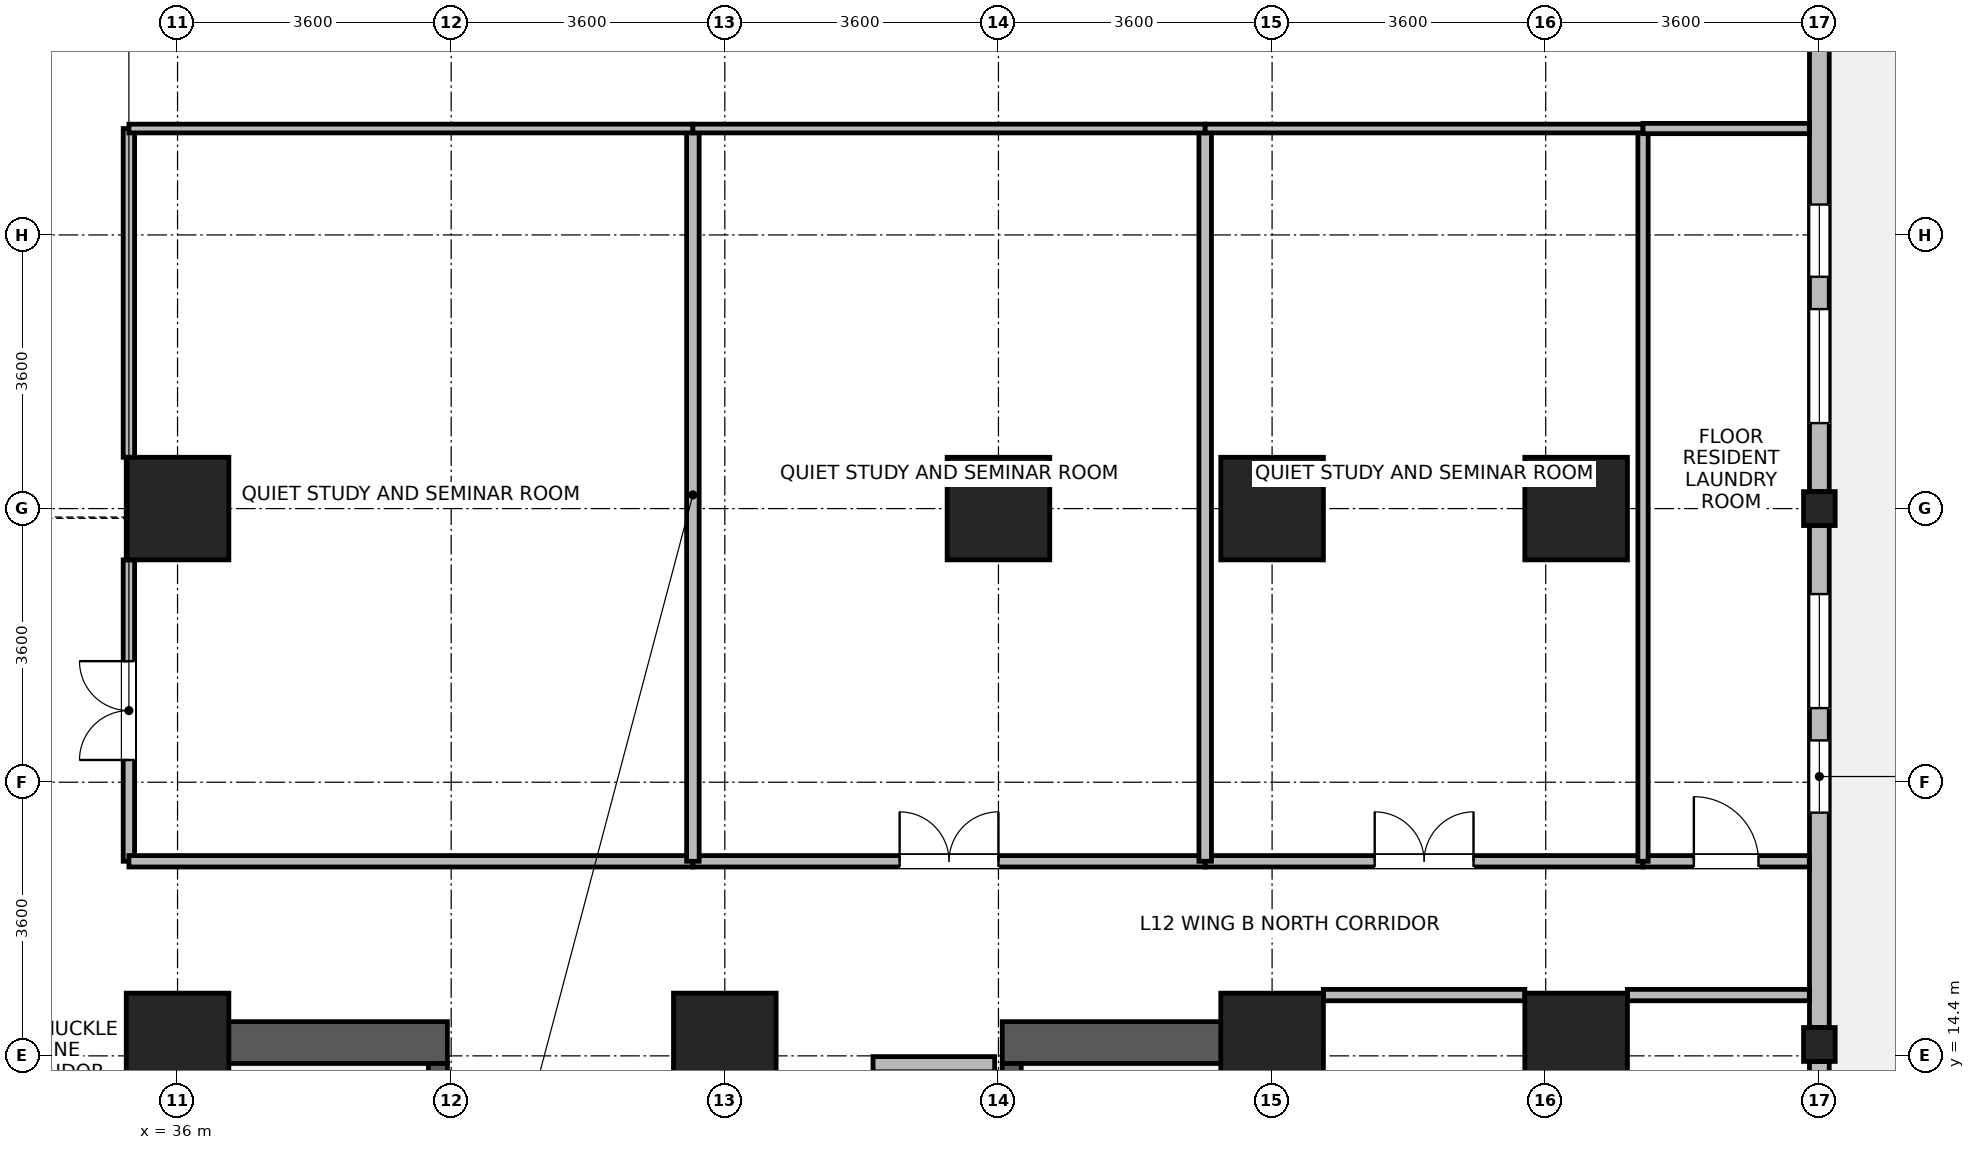
"""IFC4 building model, lengths in metres.
Left out: names, types, materials, properties, quantities, classifications, styles, units other than length and angle.
Written with IfcOpenShell. Run it as: python <this file> out.ifc"""

import sys

from ifc_helpers import new_model, si_unit, direction, frame, frame_2d, origin, origin_2d, place, context, subcontext, project, spatial, rectangle, i_section, extrude, source, transform, mapped, element, fill, save


model = new_model("IFC4")
c1 = context("Model", 3, precision=1e-05, world=origin(), true_north=direction((0.0, 1.0)))
c2 = subcontext(c1, "Body", "Model", "MODEL_VIEW")
j1 = project(units=[si_unit("LENGTHUNIT", "METRE"), si_unit("PLANEANGLEUNIT", "RADIAN")], contexts=[c1])
p1 = place(None, origin())
s1 = spatial("IfcSite", under=j1, at=p1, CompositionType="ELEMENT")
p2 = place(p1, origin())
s2 = spatial("IfcBuilding", under=s1, at=p2, CompositionType="ELEMENT")
p3 = place(p2, frame((0.0, 0.0, 51.2)))
s3 = spatial("IfcBuildingStorey", under=s2, at=p3, CompositionType="ELEMENT", Elevation=51.2)
for number, where, z_axis, x_axis in (
    (1, (36.075, 6.75, 0.0), (0.0, 0.0, 1.0), (0.0, 1.0, 0.0)),
    (2, (50.325, 6.75, 0.0), (0.0, 0.0, 1.0), (0.0, 1.0, 0.0)),
):
    element("IfcWall", number, at=place(p3, frame(where, z_axis=z_axis, x_axis=x_axis)), inside=s3, PredefinedType="SHEAR", context=c2, shape_type="SweptSolid", body=[
        extrude(rectangle(XDim=8.1, YDim=0.55, at=frame_2d((4.05, 0.0))), origin(), (0.0, 0.0, 1.0), 3.45),
    ])
for number, where, z_axis, x_axis in (
    (3, (36.35, 14.575, 0.0), (0.0, 0.0, 1.0), (1.0, 0.0, 0.0)),
    (4, (46.85, 14.575, 0.0), (0.0, 0.0, 1.0), (1.0, 0.0, 0.0)),
):
    element("IfcWall", number, at=place(p3, frame(where, z_axis=z_axis, x_axis=x_axis)), inside=s3, PredefinedType="SHEAR", context=c2, shape_type="SweptSolid", body=[
        extrude(rectangle(XDim=3.2, YDim=0.55, at=frame_2d((1.6, 0.0))), origin(), (0.0, 0.0, 1.0), 3.45),
    ])
p4 = place(p3, frame((39.425, 7.3, 0.0), z_axis=(0.0, 0.0, 1.0), x_axis=(0.0, 1.0, 0.0)))
e5 = element("IfcWall", 5, at=p4, inside=s3, PredefinedType="SHEAR", context=c2, shape_type="SweptSolid", body=[
    extrude(rectangle(XDim=7.0, YDim=0.25, at=frame_2d((3.5, 0.0))), origin(), (0.0, 0.0, 1.0), 3.45),
])
p5 = place(p4, frame((0.15, 0.0, 0.0)))
e6 = element("IfcOpeningElement", 6, at=p5, cuts=e5, PredefinedType="OPENING", context=c2, shape_type="SweptSolid", body=[
    extrude(rectangle(XDim=1.1, YDim=2.08, at=frame_2d((0.55, 1.04))), frame((0.0, 0.135, 0.0), z_axis=(0.0, -1.0, 0.0), x_axis=(1.0, 0.0, 0.0)), (0.0, 0.0, 1.0), 0.27),
])
p6 = place(p3, frame((46.975, 7.3, 0.0), z_axis=(0.0, 0.0, 1.0), x_axis=(0.0, 1.0, 0.0)))
e7 = element("IfcWall", 7, at=p6, inside=s3, PredefinedType="SHEAR", context=c2, shape_type="SweptSolid", body=[
    extrude(rectangle(XDim=7.0, YDim=0.25, at=frame_2d((3.5, 0.0))), origin(), (0.0, 0.0, 1.0), 3.45),
])
p7 = place(p6, frame((0.15, 0.0, 0.0)))
e8 = element("IfcOpeningElement", 8, at=p7, cuts=e7, PredefinedType="OPENING", context=c2, shape_type="SweptSolid", body=[
    extrude(rectangle(XDim=1.1, YDim=2.08, at=frame_2d((0.55, 1.04))), frame((0.0, 0.135, 0.0), z_axis=(0.0, -1.0, 0.0), x_axis=(1.0, 0.0, 0.0)), (0.0, 0.0, 1.0), 0.27),
])
m1 = source(origin(), c2, "Body", "SweptSolid", [
    extrude(rectangle(XDim=1.35, YDim=1.35, at=origin_2d()), origin(), (0.0, 0.0, 1.0), 3.7),
])
for number, where, z_axis, x_axis in (
    (9, (36.0, 21.6, 0.0), (0.0, 0.0, 1.0), (1.0, 0.0, 0.0)),
    (10, (46.8, 21.6, 0.0), (0.0, 0.0, 1.0), (1.0, 0.0, 0.0)),
    (11, (36.0, 14.55, 0.0), (0.0, 0.0, 1.0), (1.0, 0.0, 0.0)),
    (12, (43.2, 14.55, 0.0), (0.0, 0.0, 1.0), (1.0, 0.0, 0.0)),
    (13, (50.4, 14.55, 0.0), (0.0, 0.0, 1.0), (1.0, 0.0, 0.0)),
    (14, (50.4, 21.6, 0.0), (0.0, 0.0, 1.0), (1.0, 0.0, 0.0)),
    (15, (54.4, 14.55, 0.0), (0.0, 0.0, 1.0), (1.0, 0.0, 0.0)),
    (16, (54.4, 21.6, 0.0), (0.0, 0.0, 1.0), (1.0, 0.0, 0.0)),
):
    element("IfcColumn", number, at=place(p3, frame(where, z_axis=z_axis, x_axis=x_axis)), inside=s3, PredefinedType="COLUMN", context=c2, shape_type="MappedRepresentation", body=[
        mapped(m1, transform((0.0, 0.0, 0.0), x_axis=(1.0, 0.0, 0.0), y_axis=(0.0, 1.0, 0.0), z_axis=(0.0, 0.0, 1.0), scale=1.0)),
    ])
m2 = source(origin(), c2, "Body", "SweptSolid", [
    extrude(i_section(OverallWidth=0.416, OverallDepth=0.446, WebThickness=0.029, FlangeThickness=0.04, FilletRadius=0.015, at=origin_2d()), origin(), (0.0, 0.0, 1.0), 3.7),
])
for number, where, z_axis, x_axis in (
    (17, (57.6, 14.55, 0.0), (0.0, 0.0, 1.0), (1.0, 0.0, 0.0)),
    (18, (57.6, 21.6, 0.0), (0.0, 0.0, 1.0), (1.0, 0.0, 0.0)),
):
    element("IfcColumn", number, at=place(p3, frame(where, z_axis=z_axis, x_axis=x_axis)), inside=s3, PredefinedType="COLUMN", context=c2, shape_type="MappedRepresentation", body=[
        mapped(m2, transform((0.0, 0.0, 0.0), x_axis=(1.0, 0.0, 0.0), y_axis=(0.0, 1.0, 0.0), z_axis=(0.0, 0.0, 1.0), scale=1.0)),
    ])
p8 = place(p3, frame((57.6, 14.326, 0.0), z_axis=(0.0, 0.0, 1.0), x_axis=(0.0, -1.0, 0.0)))
e19 = element("IfcWall", 19, at=p8, inside=s3, PredefinedType="STANDARD", context=c2, shape_type="SweptSolid", body=[
    extrude(rectangle(XDim=7.052, YDim=0.26, at=frame_2d((3.526, 0.0))), origin(), (0.0, 0.0, 1.0), 2.93),
])
p9 = place(p8, frame((2.776, 0.0, 0.0)))
e20 = element("IfcOpeningElement", 20, at=p9, cuts=e19, PredefinedType="OPENING", context=c2, shape_type="SweptSolid", body=[
    extrude(rectangle(XDim=1.5, YDim=2.15, at=frame_2d((0.75, 1.075))), frame((0.0, 0.14, 0.0), z_axis=(0.0, -1.0, 0.0), x_axis=(1.0, 0.0, 0.0)), (0.0, 0.0, 1.0), 0.28),
])
p10 = place(p8, frame((1.013, 0.0, 0.85)))
e21 = element("IfcOpeningElement", 21, at=p10, cuts=e19, PredefinedType="OPENING", context=c2, shape_type="SweptSolid", body=[
    extrude(rectangle(XDim=1.5, YDim=1.85, at=frame_2d((0.75, 0.925))), frame((0.0, 0.14, 0.0), z_axis=(0.0, -1.0, 0.0), x_axis=(1.0, 0.0, 0.0)), (0.0, 0.0, 1.0), 0.28),
])
p11 = place(p8, frame((4.539, 0.0, 0.85)))
e22 = element("IfcOpeningElement", 22, at=p11, cuts=e19, PredefinedType="OPENING", context=c2, shape_type="SweptSolid", body=[
    extrude(rectangle(XDim=1.5, YDim=1.85, at=frame_2d((0.75, 0.925))), frame((0.0, 0.14, 0.0), z_axis=(0.0, -1.0, 0.0), x_axis=(1.0, 0.0, 0.0)), (0.0, 0.0, 1.0), 0.28),
])
p12 = place(p3, frame((57.6, 21.376, 0.0), z_axis=(0.0, 0.0, 1.0), x_axis=(0.0, -1.0, 0.0)))
e23 = element("IfcWall", 23, at=p12, inside=s3, PredefinedType="STANDARD", context=c2, shape_type="SweptSolid", body=[
    extrude(rectangle(XDim=6.602, YDim=0.26, at=frame_2d((3.301, 0.0))), origin(), (0.0, 0.0, 1.0), 2.93),
])
p13 = place(p12, frame((0.9, 0.0, 0.85)))
e24 = element("IfcOpeningElement", 24, at=p13, cuts=e23, PredefinedType="OPENING", context=c2, shape_type="SweptSolid", body=[
    extrude(rectangle(XDim=1.5, YDim=1.85, at=frame_2d((0.75, 0.925))), frame((0.0, 0.14, 0.0), z_axis=(0.0, -1.0, 0.0), x_axis=(1.0, 0.0, 0.0)), (0.0, 0.0, 1.0), 0.28),
])
p14 = place(p12, frame((2.826, 0.0, 0.85)))
e25 = element("IfcOpeningElement", 25, at=p14, cuts=e23, PredefinedType="OPENING", context=c2, shape_type="SweptSolid", body=[
    extrude(rectangle(XDim=0.95, YDim=1.75, at=frame_2d((0.475, 0.875))), frame((0.0, 0.14, 0.0), z_axis=(0.0, -1.0, 0.0), x_axis=(1.0, 0.0, 0.0)), (0.0, 0.0, 1.0), 0.28),
])
p15 = place(p3, frame((57.6, 28.426, 0.0), z_axis=(0.0, 0.0, 1.0), x_axis=(0.0, -1.0, 0.0)))
e26 = element("IfcWall", 26, at=p15, inside=s3, PredefinedType="STANDARD", context=c2, shape_type="SweptSolid", body=[
    extrude(rectangle(XDim=6.602, YDim=0.26, at=frame_2d((3.301, 0.0))), origin(), (0.0, 0.0, 1.0), 2.93),
])
p16 = place(p15, frame((4.201, 0.0, 0.85)))
e27 = element("IfcOpeningElement", 27, at=p16, cuts=e26, PredefinedType="OPENING", context=c2, shape_type="SweptSolid", body=[
    extrude(rectangle(XDim=1.5, YDim=1.85, at=frame_2d((0.75, 0.925))), frame((0.0, 0.14, 0.0), z_axis=(0.0, -1.0, 0.0), x_axis=(1.0, 0.0, 0.0)), (0.0, 0.0, 1.0), 0.28),
])
p17 = place(p15, frame((2.826, 0.0, 0.85)))
e28 = element("IfcOpeningElement", 28, at=p17, cuts=e26, PredefinedType="OPENING", context=c2, shape_type="SweptSolid", body=[
    extrude(rectangle(XDim=0.95, YDim=1.75, at=frame_2d((0.475, 0.875))), frame((0.0, 0.14, 0.0), z_axis=(0.0, -1.0, 0.0), x_axis=(1.0, 0.0, 0.0)), (0.0, 0.0, 1.0), 0.28),
])
p18 = place(p3, frame((45.15, 14.29, 0.0), z_axis=(0.0, 0.0, 1.0), x_axis=(1.0, 0.0, 0.0)))
e29 = element("IfcWall", 29, at=p18, inside=s3, PredefinedType="PARTITIONING", context=c2, shape_type="SweptSolid", body=[
    extrude(rectangle(XDim=1.6, YDim=0.2, at=frame_2d((0.8, 0.0))), origin(), (0.0, 0.0, 1.0), 2.23),
])
p19 = place(p3, frame((35.36, 16.96, 0.0), z_axis=(0.0, 0.0, 1.0), x_axis=(0.0, 1.0, 0.0)))
e30 = element("IfcWall", 30, at=p19, inside=s3, PredefinedType="PARTITIONING", context=c2, shape_type="SweptSolid", body=[
    extrude(rectangle(XDim=3.965, YDim=0.15, at=frame_2d((1.982, 0.0))), origin(), (0.0, 0.0, 1.0), 3.43),
])
p20 = place(p19, frame((1.333, 0.0, 0.0)))
e31 = element("IfcOpeningElement", 31, at=p20, cuts=e30, PredefinedType="OPENING", context=c2, shape_type="SweptSolid", body=[
    extrude(rectangle(XDim=1.3, YDim=2.12, at=frame_2d((0.65, 1.06))), frame((0.0, 0.085, 0.0), z_axis=(0.0, -1.0, 0.0), x_axis=(1.0, 0.0, 0.0)), (0.0, 0.0, 1.0), 0.17),
])
p21 = place(p3, frame((35.36, 22.275, 0.0), z_axis=(0.0, 0.0, 1.0), x_axis=(0.0, 1.0, 0.0)))
e32 = element("IfcWall", 32, at=p21, inside=s3, PredefinedType="PARTITIONING", context=c2, shape_type="SweptSolid", body=[
    extrude(rectangle(XDim=4.325, YDim=0.15, at=frame_2d((2.163, 0.0))), origin(), (0.0, 0.0, 1.0), 3.43),
])
p22 = place(p3, frame((35.36, 16.96, 0.0), z_axis=(0.0, 0.0, 1.0), x_axis=(1.0, 0.0, 0.0)))
e33 = element("IfcWall", 33, at=p22, inside=s3, PredefinedType="PARTITIONING", context=c2, shape_type="SweptSolid", body=[
    extrude(rectangle(XDim=7.42, YDim=0.15, at=frame_2d((3.71, 0.0))), origin(), (0.0, 0.0, 1.0), 3.43),
])
p23 = place(p3, frame((51.075, 15.2, 0.0), z_axis=(0.0, 0.0, 1.0), x_axis=(1.0, 0.0, 0.0)))
e34 = element("IfcWall", 34, at=p23, inside=s3, PredefinedType="PARTITIONING", context=c2, shape_type="SweptSolid", body=[
    extrude(rectangle(XDim=2.65, YDim=0.15, at=frame_2d((1.325, 0.0))), origin(), (0.0, 0.0, 1.0), 3.43),
])
p24 = place(p3, frame((55.075, 15.2, 0.0), z_axis=(0.0, 0.0, 1.0), x_axis=(1.0, 0.0, 0.0)))
e35 = element("IfcWall", 35, at=p24, inside=s3, PredefinedType="PARTITIONING", context=c2, shape_type="SweptSolid", body=[
    extrude(rectangle(XDim=2.393, YDim=0.15, at=frame_2d((1.197, 0.0))), origin(), (0.0, 0.0, 1.0), 3.43),
])
p25 = place(p3, frame((42.78, 16.96, 0.0), z_axis=(0.0, 0.0, 1.0), x_axis=(1.0, 0.0, 0.0)))
e36 = element("IfcWall", 36, at=p25, inside=s3, PredefinedType="PARTITIONING", context=c2, shape_type="SweptSolid", body=[
    extrude(rectangle(XDim=6.74, YDim=0.15, at=frame_2d((3.37, 0.0))), origin(), (0.0, 0.0, 1.0), 3.43),
])
p26 = place(p25, frame((2.72, 0.0, 0.0)))
e37 = element("IfcOpeningElement", 37, at=p26, cuts=e36, PredefinedType="OPENING", context=c2, shape_type="SweptSolid", body=[
    extrude(rectangle(XDim=1.3, YDim=2.12, at=frame_2d((0.65, 1.06))), frame((0.0, 0.085, 0.0), z_axis=(0.0, -1.0, 0.0), x_axis=(1.0, 0.0, 0.0)), (0.0, 0.0, 1.0), 0.17),
])
p27 = place(p3, frame((49.52, 16.96, 0.0), z_axis=(0.0, 0.0, 1.0), x_axis=(1.0, 0.0, 0.0)))
e38 = element("IfcWall", 38, at=p27, inside=s3, PredefinedType="PARTITIONING", context=c2, shape_type="SweptSolid", body=[
    extrude(rectangle(XDim=5.76, YDim=0.15, at=frame_2d((2.88, 0.0))), origin(), (0.0, 0.0, 1.0), 3.43),
])
p28 = place(p27, frame((2.23, 0.0, 0.0)))
e39 = element("IfcOpeningElement", 39, at=p28, cuts=e38, PredefinedType="OPENING", context=c2, shape_type="SweptSolid", body=[
    extrude(rectangle(XDim=1.3, YDim=2.12, at=frame_2d((0.65, 1.06))), frame((0.0, 0.085, 0.0), z_axis=(0.0, -1.0, 0.0), x_axis=(1.0, 0.0, 0.0)), (0.0, 0.0, 1.0), 0.17),
])
p29 = place(p3, frame((55.28, 16.96, 0.0), z_axis=(0.0, 0.0, 1.0), x_axis=(1.0, 0.0, 0.0)))
e40 = element("IfcWall", 40, at=p29, inside=s3, PredefinedType="PARTITIONING", context=c2, shape_type="SweptSolid", body=[
    extrude(rectangle(XDim=2.188, YDim=0.15, at=frame_2d((1.094, 0.0))), origin(), (0.0, 0.0, 1.0), 3.43),
])
p30 = place(p29, frame((0.669, 0.0, 0.0)))
e41 = element("IfcOpeningElement", 41, at=p30, cuts=e40, PredefinedType="OPENING", context=c2, shape_type="SweptSolid", body=[
    extrude(rectangle(XDim=0.85, YDim=2.04, at=frame_2d((0.425, 1.02))), frame((0.0, 0.085, 0.0), z_axis=(0.0, -1.0, 0.0), x_axis=(1.0, 0.0, 0.0)), (0.0, 0.0, 1.0), 0.17),
])
for number, where, z_axis, x_axis in (
    (42, (42.78, 16.96, 0.0), (0.0, 0.0, 1.0), (0.0, 1.0, 0.0)),
    (43, (49.52, 16.96, 0.0), (0.0, 0.0, 1.0), (0.0, 1.0, 0.0)),
):
    element("IfcWall", number, at=place(p3, frame(where, z_axis=z_axis, x_axis=x_axis)), inside=s3, PredefinedType="PARTITIONING", context=c2, shape_type="SweptSolid", body=[
        extrude(rectangle(XDim=9.64, YDim=0.165, at=frame_2d((4.82, 0.0))), origin(), (0.0, 0.0, 1.0), 3.43),
    ])
p31 = place(p3, frame((55.28, 16.96, 0.0), z_axis=(0.0, 0.0, 1.0), x_axis=(0.0, 1.0, 0.0)))
e44 = element("IfcWall", 44, at=p31, inside=s3, PredefinedType="PARTITIONING", context=c2, shape_type="SweptSolid", body=[
    extrude(rectangle(XDim=9.64, YDim=0.135, at=frame_2d((4.82, 0.0))), origin(), (0.0, 0.0, 1.0), 3.43),
])
p32 = place(p3, frame((35.36, 26.6, 0.0), z_axis=(0.0, 0.0, 1.0), x_axis=(1.0, 0.0, 0.0)))
e45 = element("IfcWall", 45, at=p32, inside=s3, PredefinedType="PARTITIONING", context=c2, shape_type="SweptSolid", body=[
    extrude(rectangle(XDim=7.42, YDim=0.115, at=frame_2d((3.71, 0.0))), origin(), (0.0, 0.0, 1.0), 3.43),
])
p33 = place(p3, frame((42.78, 26.6, 0.0), z_axis=(0.0, 0.0, 1.0), x_axis=(1.0, 0.0, 0.0)))
e46 = element("IfcWall", 46, at=p33, inside=s3, PredefinedType="PARTITIONING", context=c2, shape_type="SweptSolid", body=[
    extrude(rectangle(XDim=6.74, YDim=0.115, at=frame_2d((3.37, 0.0))), origin(), (0.0, 0.0, 1.0), 3.43),
])
p34 = place(p3, frame((49.52, 26.6, 0.0), z_axis=(0.0, 0.0, 1.0), x_axis=(1.0, 0.0, 0.0)))
e47 = element("IfcWall", 47, at=p34, inside=s3, PredefinedType="PARTITIONING", context=c2, shape_type="SweptSolid", body=[
    extrude(rectangle(XDim=5.76, YDim=0.115, at=frame_2d((2.88, 0.0))), origin(), (0.0, 0.0, 1.0), 3.43),
])
p35 = place(p3, frame((55.28, 26.6, 0.0), z_axis=(0.0, 0.0, 1.0), x_axis=(1.0, 0.0, 0.0)))
e48 = element("IfcWall", 48, at=p35, inside=s3, PredefinedType="PARTITIONING", context=c2, shape_type="SweptSolid", body=[
    extrude(rectangle(XDim=2.188, YDim=0.135, at=frame_2d((1.094, 0.0))), origin(), (0.0, 0.0, 1.0), 3.43),
])
p36 = place(p13, origin())
e49 = element("IfcWindow", 49, at=p36, inside=s3, PartitioningType="SINGLE_PANEL", PredefinedType="WINDOW", context=c2, shape_type="SweptSolid", body=[
    extrude(rectangle(XDim=1.5, YDim=1.85, at=frame_2d((0.75, 0.925))), frame((0.0, 0.03, 0.0), z_axis=(0.0, -1.0, 0.0), x_axis=(1.0, 0.0, 0.0)), (0.0, 0.0, 1.0), 0.06),
])
fill(e24, e49)
p37 = place(p14, origin())
e50 = element("IfcWindow", 50, at=p37, inside=s3, PartitioningType="SINGLE_PANEL", PredefinedType="WINDOW", context=c2, shape_type="SweptSolid", body=[
    extrude(rectangle(XDim=0.95, YDim=1.75, at=frame_2d((0.475, 0.875))), frame((0.0, 0.03, 0.0), z_axis=(0.0, -1.0, 0.0), x_axis=(1.0, 0.0, 0.0)), (0.0, 0.0, 1.0), 0.06),
])
fill(e25, e50)
p38 = place(p16, origin())
e51 = element("IfcWindow", 51, at=p38, inside=s3, PartitioningType="SINGLE_PANEL", PredefinedType="WINDOW", context=c2, shape_type="SweptSolid", body=[
    extrude(rectangle(XDim=1.5, YDim=1.85, at=frame_2d((0.75, 0.925))), frame((0.0, 0.03, 0.0), z_axis=(0.0, -1.0, 0.0), x_axis=(1.0, 0.0, 0.0)), (0.0, 0.0, 1.0), 0.06),
])
fill(e27, e51)
p39 = place(p17, origin())
e52 = element("IfcWindow", 52, at=p39, inside=s3, PartitioningType="SINGLE_PANEL", PredefinedType="WINDOW", context=c2, shape_type="SweptSolid", body=[
    extrude(rectangle(XDim=0.95, YDim=1.75, at=frame_2d((0.475, 0.875))), frame((0.0, 0.03, 0.0), z_axis=(0.0, -1.0, 0.0), x_axis=(1.0, 0.0, 0.0)), (0.0, 0.0, 1.0), 0.06),
])
fill(e28, e52)
p40 = place(p20, origin())
e53 = element("IfcDoor", 53, at=p40, inside=s3, OperationType="DOUBLE_DOOR_SINGLE_SWING", PredefinedType="DOOR", context=c2, shape_type="SweptSolid", body=[
    extrude(rectangle(XDim=1.3, YDim=2.12, at=frame_2d((0.65, 1.06))), frame((0.0, 0.025, 0.0), z_axis=(0.0, -1.0, 0.0), x_axis=(1.0, 0.0, 0.0)), (0.0, 0.0, 1.0), 0.05),
])
fill(e31, e53)
p41 = place(p26, origin())
e54 = element("IfcDoor", 54, at=p41, inside=s3, OperationType="DOUBLE_DOOR_SINGLE_SWING", PredefinedType="DOOR", context=c2, shape_type="SweptSolid", body=[
    extrude(rectangle(XDim=1.3, YDim=2.12, at=frame_2d((0.65, 1.06))), frame((0.0, 0.025, 0.0), z_axis=(0.0, -1.0, 0.0), x_axis=(1.0, 0.0, 0.0)), (0.0, 0.0, 1.0), 0.05),
])
fill(e37, e54)
p42 = place(p28, origin())
e55 = element("IfcDoor", 55, at=p42, inside=s3, OperationType="DOUBLE_DOOR_SINGLE_SWING", PredefinedType="DOOR", context=c2, shape_type="SweptSolid", body=[
    extrude(rectangle(XDim=1.3, YDim=2.12, at=frame_2d((0.65, 1.06))), frame((0.0, 0.025, 0.0), z_axis=(0.0, -1.0, 0.0), x_axis=(1.0, 0.0, 0.0)), (0.0, 0.0, 1.0), 0.05),
])
fill(e39, e55)
p43 = place(p30, origin())
e56 = element("IfcDoor", 56, at=p43, inside=s3, OperationType="SINGLE_SWING_LEFT", PredefinedType="DOOR", context=c2, shape_type="SweptSolid", body=[
    extrude(rectangle(XDim=0.85, YDim=2.04, at=frame_2d((0.425, 1.02))), frame((0.0, 0.025, 0.0), z_axis=(0.0, -1.0, 0.0), x_axis=(1.0, 0.0, 0.0)), (0.0, 0.0, 1.0), 0.05),
])
fill(e41, e56)
save(model, sys.argv[1])
